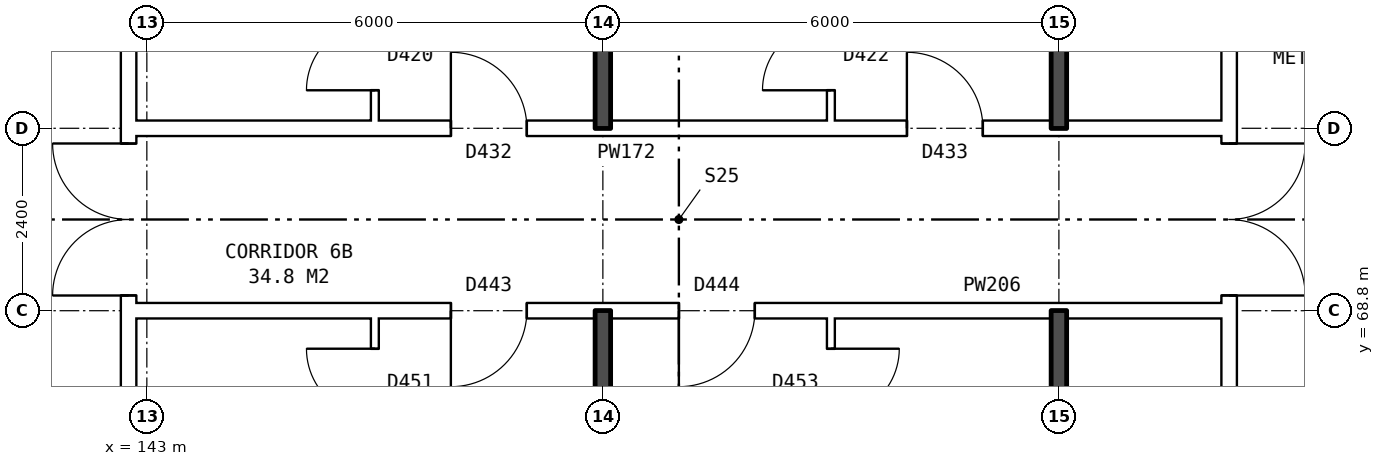
"""IFC4 building model, lengths in metres.
Left out: names, types, materials, properties, quantities, classifications, styles, units other than length and angle.
Written with IfcOpenShell. Run it as: python <this file> out.ifc"""

import sys

from ifc_helpers import new_model, si_unit, direction, frame, frame_2d, origin, place, context, subcontext, project, spatial, rectangle, extrude, element, fill, save


model = new_model("IFC4")
c1 = context("Model", 3, precision=1e-05, world=origin(), true_north=direction((0.0, 1.0)))
c2 = subcontext(c1, "Body", "Model", "MODEL_VIEW")
j1 = project(units=[si_unit("LENGTHUNIT", "METRE"), si_unit("PLANEANGLEUNIT", "RADIAN")], contexts=[c1])
p1 = place(None, origin())
s1 = spatial("IfcSite", under=j1, at=p1, CompositionType="ELEMENT")
p2 = place(p1, origin())
s2 = spatial("IfcBuilding", under=s1, at=p2, CompositionType="ELEMENT")
p3 = place(p2, frame((0.0, 0.0, 25.7)))
s3 = spatial("IfcBuildingStorey", under=s2, at=p3, CompositionType="ELEMENT", Elevation=25.7)
p4 = place(p3, frame((142.76, 63.9, 0.0), z_axis=(0.0, 0.0, 1.0), x_axis=(0.0, 1.0, 0.0)))
e1 = element("IfcWall", 1, at=p4, inside=s3, PredefinedType="PARTITIONING", context=c2, shape_type="SweptSolid", body=[
    extrude(rectangle(XDim=12.2, YDim=0.2, at=frame_2d((6.1, 0.0))), origin(), (0.0, 0.0, 1.0), 2.85),
])
p5 = place(p4, frame((5.1, 0.0, 0.0)))
e2 = element("IfcOpeningElement", 2, at=p5, cuts=e1, PredefinedType="OPENING", context=c2, shape_type="SweptSolid", body=[
    extrude(rectangle(XDim=2.0, YDim=2.1, at=frame_2d((1.0, 1.05))), frame((0.0, 0.11, 0.0), z_axis=(0.0, -1.0, 0.0), x_axis=(1.0, 0.0, 0.0)), (0.0, 0.0, 1.0), 0.22),
])
p6 = place(p3, frame((157.24, 63.9, 0.0), z_axis=(0.0, 0.0, 1.0), x_axis=(0.0, 1.0, 0.0)))
e3 = element("IfcWall", 3, at=p6, inside=s3, PredefinedType="PARTITIONING", context=c2, shape_type="SweptSolid", body=[
    extrude(rectangle(XDim=12.2, YDim=0.2, at=frame_2d((6.1, 0.0))), origin(), (0.0, 0.0, 1.0), 2.85),
])
p7 = place(p6, frame((5.1, 0.0, 0.0)))
e4 = element("IfcOpeningElement", 4, at=p7, cuts=e3, PredefinedType="OPENING", context=c2, shape_type="SweptSolid", body=[
    extrude(rectangle(XDim=2.0, YDim=2.1, at=frame_2d((1.0, 1.05))), frame((0.0, 0.11, 0.0), z_axis=(0.0, -1.0, 0.0), x_axis=(1.0, 0.0, 0.0)), (0.0, 0.0, 1.0), 0.22),
])
p8 = place(p3, frame((142.76, 68.8, 0.0), z_axis=(0.0, 0.0, 1.0), x_axis=(1.0, 0.0, 0.0)))
e5 = element("IfcWall", 5, at=p8, inside=s3, PredefinedType="PARTITIONING", context=c2, shape_type="SweptSolid", body=[
    extrude(rectangle(XDim=14.48, YDim=0.2, at=frame_2d((7.24, 0.0))), origin(), (0.0, 0.0, 1.0), 2.85),
])
p9 = place(p8, frame((4.24, 0.0, 0.0)))
e6 = element("IfcOpeningElement", 6, at=p9, cuts=e5, PredefinedType="OPENING", context=c2, shape_type="SweptSolid", body=[
    extrude(rectangle(XDim=1.0, YDim=2.1, at=frame_2d((0.5, 1.05))), frame((0.0, 0.11, 0.0), z_axis=(0.0, -1.0, 0.0), x_axis=(1.0, 0.0, 0.0)), (0.0, 0.0, 1.0), 0.22),
])
p10 = place(p8, frame((7.24, 0.0, 0.0)))
e7 = element("IfcOpeningElement", 7, at=p10, cuts=e5, PredefinedType="OPENING", context=c2, shape_type="SweptSolid", body=[
    extrude(rectangle(XDim=1.0, YDim=2.1, at=frame_2d((0.5, 1.05))), frame((0.0, 0.11, 0.0), z_axis=(0.0, -1.0, 0.0), x_axis=(1.0, 0.0, 0.0)), (0.0, 0.0, 1.0), 0.22),
])
p11 = place(p3, frame((142.76, 71.2, 0.0), z_axis=(0.0, 0.0, 1.0), x_axis=(1.0, 0.0, 0.0)))
e8 = element("IfcWall", 8, at=p11, inside=s3, PredefinedType="PARTITIONING", context=c2, shape_type="SweptSolid", body=[
    extrude(rectangle(XDim=14.48, YDim=0.2, at=frame_2d((7.24, 0.0))), origin(), (0.0, 0.0, 1.0), 2.85),
])
p12 = place(p11, frame((4.24, 0.0, 0.0)))
e9 = element("IfcOpeningElement", 9, at=p12, cuts=e8, PredefinedType="OPENING", context=c2, shape_type="SweptSolid", body=[
    extrude(rectangle(XDim=1.0, YDim=2.1, at=frame_2d((0.5, 1.05))), frame((0.0, 0.11, 0.0), z_axis=(0.0, -1.0, 0.0), x_axis=(1.0, 0.0, 0.0)), (0.0, 0.0, 1.0), 0.22),
])
p13 = place(p11, frame((10.24, 0.0, 0.0)))
e10 = element("IfcOpeningElement", 10, at=p13, cuts=e8, PredefinedType="OPENING", context=c2, shape_type="SweptSolid", body=[
    extrude(rectangle(XDim=1.0, YDim=2.1, at=frame_2d((0.5, 1.05))), frame((0.0, 0.11, 0.0), z_axis=(0.0, -1.0, 0.0), x_axis=(1.0, 0.0, 0.0)), (0.0, 0.0, 1.0), 0.22),
])
p14 = place(p3, frame((146.0, 54.36, 0.0), z_axis=(0.0, 0.0, 1.0), x_axis=(0.0, 1.0, 0.0)))
e11 = element("IfcWall", 11, at=p14, inside=s3, PredefinedType="PARTITIONING", context=c2, shape_type="SweptSolid", body=[
    extrude(rectangle(XDim=14.34, YDim=0.1, at=frame_2d((7.17, 0.0))), origin(), (0.0, 0.0, 1.0), 2.85),
])
p15 = place(p14, frame((7.7, 0.0, 0.0)))
e12 = element("IfcOpeningElement", 12, at=p15, cuts=e11, PredefinedType="OPENING", context=c2, shape_type="SweptSolid", body=[
    extrude(rectangle(XDim=0.9, YDim=2.1, at=frame_2d((0.45, 1.05))), frame((0.0, 0.06, 0.0), z_axis=(0.0, -1.0, 0.0), x_axis=(1.0, 0.0, 0.0)), (0.0, 0.0, 1.0), 0.12),
])
p16 = place(p14, frame((13.04, 0.0, 0.0)))
e13 = element("IfcOpeningElement", 13, at=p16, cuts=e11, PredefinedType="OPENING", context=c2, shape_type="SweptSolid", body=[
    extrude(rectangle(XDim=0.9, YDim=2.1, at=frame_2d((0.45, 1.05))), frame((0.0, 0.06, 0.0), z_axis=(0.0, -1.0, 0.0), x_axis=(1.0, 0.0, 0.0)), (0.0, 0.0, 1.0), 0.12),
])
p17 = place(p3, frame((146.0, 71.3, 0.0), z_axis=(0.0, 0.0, 1.0), x_axis=(0.0, 1.0, 0.0)))
e14 = element("IfcWall", 14, at=p17, inside=s3, PredefinedType="PARTITIONING", context=c2, shape_type="SweptSolid", body=[
    extrude(rectangle(XDim=14.34, YDim=0.1, at=frame_2d((7.17, 0.0))), origin(), (0.0, 0.0, 1.0), 2.85),
])
p18 = place(p17, frame((5.74, 0.0, 0.0)))
e15 = element("IfcOpeningElement", 15, at=p18, cuts=e14, PredefinedType="OPENING", context=c2, shape_type="SweptSolid", body=[
    extrude(rectangle(XDim=0.9, YDim=2.1, at=frame_2d((0.45, 1.05))), frame((0.0, 0.06, 0.0), z_axis=(0.0, -1.0, 0.0), x_axis=(1.0, 0.0, 0.0)), (0.0, 0.0, 1.0), 0.12),
])
p19 = place(p17, frame((0.4, 0.0, 0.0)))
e16 = element("IfcOpeningElement", 16, at=p19, cuts=e14, PredefinedType="OPENING", context=c2, shape_type="SweptSolid", body=[
    extrude(rectangle(XDim=0.9, YDim=2.1, at=frame_2d((0.45, 1.05))), frame((0.0, 0.06, 0.0), z_axis=(0.0, -1.0, 0.0), x_axis=(1.0, 0.0, 0.0)), (0.0, 0.0, 1.0), 0.12),
])
for number, where, z_axis, x_axis in (
    (17, (149.0, 54.36, 0.0), (0.0, 0.0, 1.0), (0.0, 1.0, 0.0)),
    (18, (149.0, 71.2, 0.0), (0.0, 0.0, 1.0), (0.0, 1.0, 0.0)),
):
    element("IfcWall", number, at=place(p3, frame(where, z_axis=z_axis, x_axis=x_axis)), inside=s3, PredefinedType="SOLIDWALL", context=c2, shape_type="SweptSolid", body=[
        extrude(rectangle(XDim=14.44, YDim=0.2, at=frame_2d((7.22, 0.0))), origin(), (0.0, 0.0, 1.0), 2.85),
    ])
p20 = place(p3, frame((152.0, 54.36, 0.0), z_axis=(0.0, 0.0, 1.0), x_axis=(0.0, 1.0, 0.0)))
e19 = element("IfcWall", 19, at=p20, inside=s3, PredefinedType="PARTITIONING", context=c2, shape_type="SweptSolid", body=[
    extrude(rectangle(XDim=14.34, YDim=0.1, at=frame_2d((7.17, 0.0))), origin(), (0.0, 0.0, 1.0), 2.85),
])
p21 = place(p20, frame((4.2, 0.0, 0.0)))
e20 = element("IfcOpeningElement", 20, at=p21, cuts=e19, PredefinedType="OPENING", context=c2, shape_type="SweptSolid", body=[
    extrude(rectangle(XDim=0.9, YDim=2.1, at=frame_2d((0.45, 1.05))), frame((0.0, 0.06, 0.0), z_axis=(0.0, -1.0, 0.0), x_axis=(1.0, 0.0, 0.0)), (0.0, 0.0, 1.0), 0.12),
])
p22 = place(p20, frame((13.04, 0.0, 0.0)))
e21 = element("IfcOpeningElement", 21, at=p22, cuts=e19, PredefinedType="OPENING", context=c2, shape_type="SweptSolid", body=[
    extrude(rectangle(XDim=0.9, YDim=2.1, at=frame_2d((0.45, 1.05))), frame((0.0, 0.06, 0.0), z_axis=(0.0, -1.0, 0.0), x_axis=(1.0, 0.0, 0.0)), (0.0, 0.0, 1.0), 0.12),
])
p23 = place(p3, frame((152.0, 71.3, 0.0), z_axis=(0.0, 0.0, 1.0), x_axis=(0.0, 1.0, 0.0)))
e22 = element("IfcWall", 22, at=p23, inside=s3, PredefinedType="PARTITIONING", context=c2, shape_type="SweptSolid", body=[
    extrude(rectangle(XDim=14.34, YDim=0.1, at=frame_2d((7.17, 0.0))), origin(), (0.0, 0.0, 1.0), 2.85),
])
p24 = place(p23, frame((6.74, 0.0, 0.0)))
e23 = element("IfcOpeningElement", 23, at=p24, cuts=e22, PredefinedType="OPENING", context=c2, shape_type="SweptSolid", body=[
    extrude(rectangle(XDim=0.9, YDim=2.1, at=frame_2d((0.45, 1.05))), frame((0.0, 0.06, 0.0), z_axis=(0.0, -1.0, 0.0), x_axis=(1.0, 0.0, 0.0)), (0.0, 0.0, 1.0), 0.12),
])
p25 = place(p23, frame((0.4, 0.0, 0.0)))
e24 = element("IfcOpeningElement", 24, at=p25, cuts=e22, PredefinedType="OPENING", context=c2, shape_type="SweptSolid", body=[
    extrude(rectangle(XDim=0.9, YDim=2.1, at=frame_2d((0.45, 1.05))), frame((0.0, 0.06, 0.0), z_axis=(0.0, -1.0, 0.0), x_axis=(1.0, 0.0, 0.0)), (0.0, 0.0, 1.0), 0.12),
])
for number, where, z_axis, x_axis in (
    (25, (155.0, 63.8, 0.0), (0.0, 0.0, 1.0), (0.0, 1.0, 0.0)),
    (26, (155.0, 71.2, 0.0), (0.0, 0.0, 1.0), (0.0, 1.0, 0.0)),
):
    element("IfcWall", number, at=place(p3, frame(where, z_axis=z_axis, x_axis=x_axis)), inside=s3, PredefinedType="SOLIDWALL", context=c2, shape_type="SweptSolid", body=[
        extrude(rectangle(XDim=5.0, YDim=0.2, at=frame_2d((2.5, 0.0))), origin(), (0.0, 0.0, 1.0), 2.85),
    ])
p26 = place(p5, origin())
e27 = element("IfcDoor", 27, at=p26, inside=s3, OperationType="DOUBLE_DOOR_SINGLE_SWING", PredefinedType="DOOR", context=c2, shape_type="SweptSolid", body=[
    extrude(rectangle(XDim=2.0, YDim=2.1, at=frame_2d((1.0, 1.05))), frame((0.0, 0.025, 0.0), z_axis=(0.0, -1.0, 0.0), x_axis=(1.0, 0.0, 0.0)), (0.0, 0.0, 1.0), 0.05),
])
fill(e2, e27)
p27 = place(p7, frame((2.0, 0.0, 0.0), z_axis=(0.0, 0.0, 1.0), x_axis=(-1.0, 0.0, 0.0)))
e28 = element("IfcDoor", 28, at=p27, inside=s3, OperationType="DOUBLE_DOOR_SINGLE_SWING", PredefinedType="DOOR", context=c2, shape_type="SweptSolid", body=[
    extrude(rectangle(XDim=2.0, YDim=2.1, at=frame_2d((1.0, 1.05))), frame((0.0, 0.025, 0.0), z_axis=(0.0, -1.0, 0.0), x_axis=(1.0, 0.0, 0.0)), (0.0, 0.0, 1.0), 0.05),
])
fill(e4, e28)
p28 = place(p9, frame((1.0, 0.0, 0.0), z_axis=(0.0, 0.0, 1.0), x_axis=(-1.0, 0.0, 0.0)))
e29 = element("IfcDoor", 29, at=p28, inside=s3, OperationType="SINGLE_SWING_RIGHT", PredefinedType="DOOR", context=c2, shape_type="SweptSolid", body=[
    extrude(rectangle(XDim=1.0, YDim=2.1, at=frame_2d((0.5, 1.05))), frame((0.0, 0.025, 0.0), z_axis=(0.0, -1.0, 0.0), x_axis=(1.0, 0.0, 0.0)), (0.0, 0.0, 1.0), 0.05),
])
fill(e6, e29)
p29 = place(p16, origin())
e30 = element("IfcDoor", 30, at=p29, inside=s3, OperationType="SINGLE_SWING_RIGHT", PredefinedType="DOOR", context=c2, shape_type="SweptSolid", body=[
    extrude(rectangle(XDim=0.9, YDim=2.1, at=frame_2d((0.45, 1.05))), frame((0.0, 0.025, 0.0), z_axis=(0.0, -1.0, 0.0), x_axis=(1.0, 0.0, 0.0)), (0.0, 0.0, 1.0), 0.05),
])
fill(e13, e30)
p30 = place(p10, frame((1.0, 0.0, 0.0), z_axis=(0.0, 0.0, 1.0), x_axis=(-1.0, 0.0, 0.0)))
e31 = element("IfcDoor", 31, at=p30, inside=s3, OperationType="SINGLE_SWING_RIGHT", PredefinedType="DOOR", context=c2, shape_type="SweptSolid", body=[
    extrude(rectangle(XDim=1.0, YDim=2.1, at=frame_2d((0.5, 1.05))), frame((0.0, 0.025, 0.0), z_axis=(0.0, -1.0, 0.0), x_axis=(1.0, 0.0, 0.0)), (0.0, 0.0, 1.0), 0.05),
])
fill(e7, e31)
p31 = place(p22, frame((0.9, 0.0, 0.0), z_axis=(0.0, 0.0, 1.0), x_axis=(-1.0, 0.0, 0.0)))
e32 = element("IfcDoor", 32, at=p31, inside=s3, OperationType="SINGLE_SWING_LEFT", PredefinedType="DOOR", context=c2, shape_type="SweptSolid", body=[
    extrude(rectangle(XDim=0.9, YDim=2.1, at=frame_2d((0.45, 1.05))), frame((0.0, 0.025, 0.0), z_axis=(0.0, -1.0, 0.0), x_axis=(1.0, 0.0, 0.0)), (0.0, 0.0, 1.0), 0.05),
])
fill(e21, e32)
p32 = place(p12, origin())
e33 = element("IfcDoor", 33, at=p32, inside=s3, OperationType="SINGLE_SWING_LEFT", PredefinedType="DOOR", context=c2, shape_type="SweptSolid", body=[
    extrude(rectangle(XDim=1.0, YDim=2.1, at=frame_2d((0.5, 1.05))), frame((0.0, 0.025, 0.0), z_axis=(0.0, -1.0, 0.0), x_axis=(1.0, 0.0, 0.0)), (0.0, 0.0, 1.0), 0.05),
])
fill(e9, e33)
p33 = place(p19, origin())
e34 = element("IfcDoor", 34, at=p33, inside=s3, OperationType="SINGLE_SWING_LEFT", PredefinedType="DOOR", context=c2, shape_type="SweptSolid", body=[
    extrude(rectangle(XDim=0.9, YDim=2.1, at=frame_2d((0.45, 1.05))), frame((0.0, 0.025, 0.0), z_axis=(0.0, -1.0, 0.0), x_axis=(1.0, 0.0, 0.0)), (0.0, 0.0, 1.0), 0.05),
])
fill(e16, e34)
p34 = place(p13, origin())
e35 = element("IfcDoor", 35, at=p34, inside=s3, OperationType="SINGLE_SWING_LEFT", PredefinedType="DOOR", context=c2, shape_type="SweptSolid", body=[
    extrude(rectangle(XDim=1.0, YDim=2.1, at=frame_2d((0.5, 1.05))), frame((0.0, 0.025, 0.0), z_axis=(0.0, -1.0, 0.0), x_axis=(1.0, 0.0, 0.0)), (0.0, 0.0, 1.0), 0.05),
])
fill(e10, e35)
p35 = place(p25, origin())
e36 = element("IfcDoor", 36, at=p35, inside=s3, OperationType="SINGLE_SWING_LEFT", PredefinedType="DOOR", context=c2, shape_type="SweptSolid", body=[
    extrude(rectangle(XDim=0.9, YDim=2.1, at=frame_2d((0.45, 1.05))), frame((0.0, 0.025, 0.0), z_axis=(0.0, -1.0, 0.0), x_axis=(1.0, 0.0, 0.0)), (0.0, 0.0, 1.0), 0.05),
])
fill(e24, e36)
save(model, sys.argv[1])
